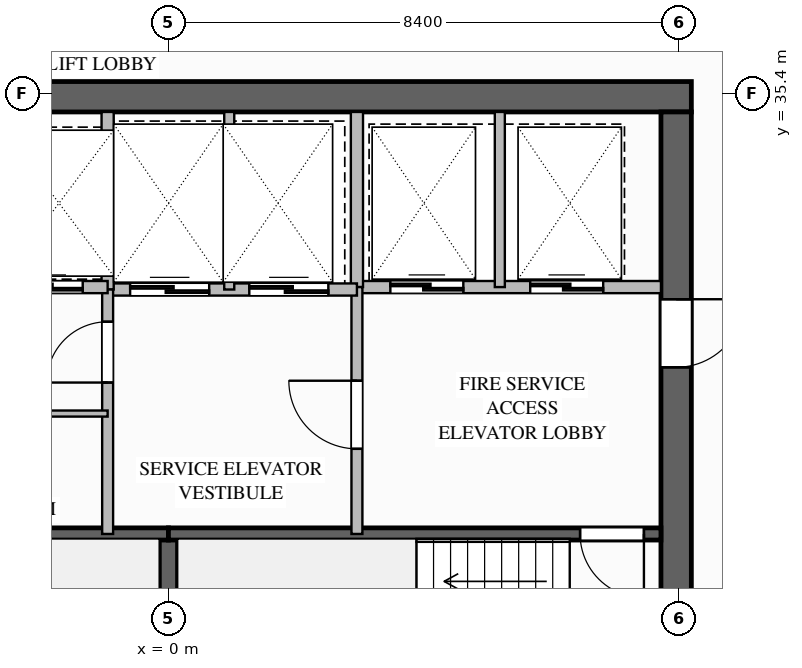
"""IFC4 building model, lengths in metres.
Left out: names, types, materials, properties, quantities, classifications, styles, units other than length and angle.
Written with IfcOpenShell. Run it as: python <this file> out.ifc"""

import sys

from ifc_helpers import new_model, si_unit, direction, frame, frame_2d, origin, place, context, subcontext, project, spatial, rectangle, extrude, element, fill, save


model = new_model("IFC4")
c1 = context("Model", 3, precision=1e-05, world=origin(), true_north=direction((0.0, 1.0)))
c2 = subcontext(c1, "Body", "Model", "MODEL_VIEW")
j1 = project(units=[si_unit("LENGTHUNIT", "METRE"), si_unit("PLANEANGLEUNIT", "RADIAN")], contexts=[c1])
p1 = place(None, origin())
s1 = spatial("IfcSite", under=j1, at=p1, CompositionType="ELEMENT")
p2 = place(p1, origin())
s2 = spatial("IfcBuilding", under=s1, at=p2, CompositionType="ELEMENT")
p3 = place(p2, frame((0.0, 0.0, 161.05)))
s3 = spatial("IfcBuildingStorey", under=s2, at=p3, CompositionType="ELEMENT", Elevation=161.05)
p4 = place(p3, frame((-8.6, 35.35, 0.0), z_axis=(0.0, 0.0, 1.0), x_axis=(1.0, 0.0, 0.0)))
e1 = element("IfcWall", 1, at=p4, inside=s3, PredefinedType="SHEAR", context=c2, shape_type="SweptSolid", body=[
    extrude(rectangle(XDim=17.2, YDim=0.5, at=frame_2d((8.6, 0.0))), origin(), (0.0, 0.0, 1.0), 3.55),
])
p5 = place(p3, frame((8.35, 35.1, 0.0), z_axis=(0.0, 0.0, 1.0), x_axis=(0.0, -1.0, 0.0)))
e2 = element("IfcWall", 2, at=p5, inside=s3, PredefinedType="SHEAR", context=c2, shape_type="SweptSolid", body=[
    extrude(rectangle(XDim=16.2, YDim=0.5, at=frame_2d((8.1, 0.0))), origin(), (0.0, 0.0, 1.0), 3.55),
])
p6 = place(p5, frame((3.08, 0.0, 0.0)))
e3 = element("IfcOpeningElement", 3, at=p6, cuts=e2, PredefinedType="OPENING", context=c2, shape_type="SweptSolid", body=[
    extrude(rectangle(XDim=1.12, YDim=2.1, at=frame_2d((0.56, 1.05))), frame((0.0, 0.26, 0.0), z_axis=(0.0, -1.0, 0.0), x_axis=(1.0, 0.0, 0.0)), (0.0, 0.0, 1.0), 0.52),
])
p7 = place(p5, frame((10.62, 0.0, 0.0)))
e4 = element("IfcOpeningElement", 4, at=p7, cuts=e2, PredefinedType="OPENING", context=c2, shape_type="SweptSolid", body=[
    extrude(rectangle(XDim=1.08, YDim=2.04, at=frame_2d((0.54, 1.02))), frame((0.0, 0.26, 0.0), z_axis=(0.0, -1.0, 0.0), x_axis=(1.0, 0.0, 0.0)), (0.0, 0.0, 1.0), 0.52),
])
p8 = place(p3, frame((0.0, 25.04, 0.0), z_axis=(0.0, 0.0, 1.0), x_axis=(0.0, 1.0, 0.0)))
e5 = element("IfcWall", 5, at=p8, inside=s3, PredefinedType="SOLIDWALL", context=c2, shape_type="SweptSolid", body=[
    extrude(rectangle(XDim=3.12, YDim=0.3, at=frame_2d((1.56, 0.0))), origin(), (0.0, 0.0, 1.0), 3.29),
])
p9 = place(p3, frame((-8.1, 28.16, 0.0), z_axis=(0.0, 0.0, 1.0), x_axis=(1.0, 0.0, 0.0)))
e6 = element("IfcWall", 6, at=p9, inside=s3, PredefinedType="SOLIDWALL", context=c2, shape_type="SweptSolid", body=[
    extrude(rectangle(XDim=8.1, YDim=0.2, at=frame_2d((4.05, 0.0))), origin(), (0.0, 0.0, 1.0), 3.29),
])
p10 = place(p3, frame((8.1, 28.16, 0.0), z_axis=(0.0, 0.0, 1.0), x_axis=(-1.0, 0.0, 0.0)))
e7 = element("IfcWall", 7, at=p10, inside=s3, PredefinedType="SOLIDWALL", context=c2, shape_type="SweptSolid", body=[
    extrude(rectangle(XDim=8.1, YDim=0.2, at=frame_2d((4.05, 0.0))), origin(), (0.0, 0.0, 1.0), 3.29),
])
p11 = place(p10, frame((0.28, 0.0, 0.0)))
e8 = element("IfcOpeningElement", 8, at=p11, cuts=e7, PredefinedType="OPENING", context=c2, shape_type="SweptSolid", body=[
    extrude(rectangle(XDim=1.05, YDim=2.1, at=frame_2d((0.525, 1.05))), frame((0.0, 0.11, 0.0), z_axis=(0.0, -1.0, 0.0), x_axis=(1.0, 0.0, 0.0)), (0.0, 0.0, 1.0), 0.22),
])
p12 = place(p3, frame((3.1, 32.22, 0.0), z_axis=(0.0, 0.0, 1.0), x_axis=(1.0, 0.0, 0.0)))
e9 = element("IfcWall", 9, at=p12, inside=s3, PredefinedType="SOLIDWALL", context=c2, shape_type="SweptSolid", body=[
    extrude(rectangle(XDim=5.0, YDim=0.2, at=frame_2d((2.5, 0.0))), origin(), (0.0, 0.0, 1.0), 3.29),
])
p13 = place(p12, frame((0.55, 0.0, 0.0)))
e10 = element("IfcOpeningElement", 10, at=p13, cuts=e9, PredefinedType="OPENING", context=c2, shape_type="SweptSolid", body=[
    extrude(rectangle(XDim=1.2, YDim=2.2, at=frame_2d((0.6, 1.1))), frame((0.0, 0.11, 0.0), z_axis=(0.0, -1.0, 0.0), x_axis=(1.0, 0.0, 0.0)), (0.0, 0.0, 1.0), 0.22),
])
p14 = place(p12, frame((2.85, 0.0, 0.0)))
e11 = element("IfcOpeningElement", 11, at=p14, cuts=e9, PredefinedType="OPENING", context=c2, shape_type="SweptSolid", body=[
    extrude(rectangle(XDim=1.2, YDim=2.2, at=frame_2d((0.6, 1.1))), frame((0.0, 0.11, 0.0), z_axis=(0.0, -1.0, 0.0), x_axis=(1.0, 0.0, 0.0)), (0.0, 0.0, 1.0), 0.22),
])
p15 = place(p3, frame((3.1, 32.22, 0.0), z_axis=(0.0, 0.0, 1.0), x_axis=(0.0, 1.0, 0.0)))
e12 = element("IfcWall", 12, at=p15, inside=s3, PredefinedType="SOLIDWALL", context=c2, shape_type="SweptSolid", body=[
    extrude(rectangle(XDim=2.88, YDim=0.2, at=frame_2d((1.44, 0.0))), origin(), (0.0, 0.0, 1.0), 3.29),
])
p16 = place(p3, frame((5.45, 32.22, 0.0), z_axis=(0.0, 0.0, 1.0), x_axis=(0.0, 1.0, 0.0)))
e13 = element("IfcWall", 13, at=p16, inside=s3, PredefinedType="PARTITIONING", context=c2, shape_type="SweptSolid", body=[
    extrude(rectangle(XDim=2.88, YDim=0.165, at=frame_2d((1.44, 0.0))), origin(), (0.0, 0.0, 1.0), 3.29),
])
p17 = place(p3, frame((3.1, 28.16, 0.0), z_axis=(0.0, 0.0, 1.0), x_axis=(0.0, 1.0, 0.0)))
e14 = element("IfcWall", 14, at=p17, inside=s3, PredefinedType="SOLIDWALL", context=c2, shape_type="SweptSolid", body=[
    extrude(rectangle(XDim=4.06, YDim=0.18, at=frame_2d((2.03, 0.0))), origin(), (0.0, 0.0, 1.0), 3.29),
])
p18 = place(p17, frame((1.4, 0.0, 0.0)))
e15 = element("IfcOpeningElement", 15, at=p18, cuts=e14, PredefinedType="OPENING", context=c2, shape_type="SweptSolid", body=[
    extrude(rectangle(XDim=1.12, YDim=2.1, at=frame_2d((0.56, 1.05))), frame((0.0, 0.1, 0.0), z_axis=(0.0, -1.0, 0.0), x_axis=(1.0, 0.0, 0.0)), (0.0, 0.0, 1.0), 0.2),
])
p19 = place(p3, frame((-1.0, 32.18, 0.0), z_axis=(0.0, 0.0, 1.0), x_axis=(1.0, 0.0, 0.0)))
e16 = element("IfcWall", 16, at=p19, inside=s3, PredefinedType="SOLIDWALL", context=c2, shape_type="SweptSolid", body=[
    extrude(rectangle(XDim=4.1, YDim=0.2, at=frame_2d((2.05, 0.0))), origin(), (0.0, 0.0, 1.0), 3.29),
])
p20 = place(p19, frame((0.37, 0.0, 0.0)))
e17 = element("IfcOpeningElement", 17, at=p20, cuts=e16, PredefinedType="OPENING", context=c2, shape_type="SweptSolid", body=[
    extrude(rectangle(XDim=1.3, YDim=2.2, at=frame_2d((0.65, 1.1))), frame((0.0, 0.11, 0.0), z_axis=(0.0, -1.0, 0.0), x_axis=(1.0, 0.0, 0.0)), (0.0, 0.0, 1.0), 0.22),
])
p21 = place(p19, frame((2.33, 0.0, 0.0)))
e18 = element("IfcOpeningElement", 18, at=p21, cuts=e16, PredefinedType="OPENING", context=c2, shape_type="SweptSolid", body=[
    extrude(rectangle(XDim=1.3, YDim=2.2, at=frame_2d((0.65, 1.1))), frame((0.0, 0.11, 0.0), z_axis=(0.0, -1.0, 0.0), x_axis=(1.0, 0.0, 0.0)), (0.0, 0.0, 1.0), 0.22),
])
p22 = place(p3, frame((-1.0, 32.18, 0.0), z_axis=(0.0, 0.0, 1.0), x_axis=(0.0, 1.0, 0.0)))
e19 = element("IfcWall", 19, at=p22, inside=s3, PredefinedType="SOLIDWALL", context=c2, shape_type="SweptSolid", body=[
    extrude(rectangle(XDim=2.92, YDim=0.2, at=frame_2d((1.46, 0.0))), origin(), (0.0, 0.0, 1.0), 3.29),
])
p23 = place(p3, frame((1.0, 32.18, 0.0), z_axis=(0.0, 0.0, 1.0), x_axis=(0.0, 1.0, 0.0)))
e20 = element("IfcWall", 20, at=p23, inside=s3, PredefinedType="PARTITIONING", context=c2, shape_type="SweptSolid", body=[
    extrude(rectangle(XDim=2.92, YDim=0.165, at=frame_2d((1.46, 0.0))), origin(), (0.0, 0.0, 1.0), 3.29),
])
p24 = place(p3, frame((-1.0, 28.16, 0.0), z_axis=(0.0, 0.0, 1.0), x_axis=(0.0, 1.0, 0.0)))
e21 = element("IfcWall", 21, at=p24, inside=s3, PredefinedType="SOLIDWALL", context=c2, shape_type="SweptSolid", body=[
    extrude(rectangle(XDim=4.02, YDim=0.18, at=frame_2d((2.01, 0.0))), origin(), (0.0, 0.0, 1.0), 3.29),
])
p25 = place(p24, frame((2.49, 0.0, 0.0)))
e22 = element("IfcOpeningElement", 22, at=p25, cuts=e21, PredefinedType="OPENING", context=c2, shape_type="SweptSolid", body=[
    extrude(rectangle(XDim=1.0, YDim=2.1, at=frame_2d((0.5, 1.05))), frame((0.0, 0.1, 0.0), z_axis=(0.0, -1.0, 0.0), x_axis=(1.0, 0.0, 0.0)), (0.0, 0.0, 1.0), 0.2),
])
p26 = place(p3, frame((-8.1, 32.22, 0.0), z_axis=(0.0, 0.0, 1.0), x_axis=(1.0, 0.0, 0.0)))
e23 = element("IfcWall", 23, at=p26, inside=s3, PredefinedType="SOLIDWALL", context=c2, shape_type="SweptSolid", body=[
    extrude(rectangle(XDim=7.1, YDim=0.2, at=frame_2d((3.55, 0.0))), origin(), (0.0, 0.0, 1.0), 3.29),
])
p27 = place(p26, frame((0.95, 0.0, 0.0)))
e24 = element("IfcOpeningElement", 24, at=p27, cuts=e23, PredefinedType="OPENING", context=c2, shape_type="SweptSolid", body=[
    extrude(rectangle(XDim=1.1, YDim=2.2, at=frame_2d((0.55, 1.1))), frame((0.0, 0.11, 0.0), z_axis=(0.0, -1.0, 0.0), x_axis=(1.0, 0.0, 0.0)), (0.0, 0.0, 1.0), 0.22),
])
p28 = place(p26, frame((3.27, 0.0, 0.0)))
e25 = element("IfcOpeningElement", 25, at=p28, cuts=e23, PredefinedType="OPENING", context=c2, shape_type="SweptSolid", body=[
    extrude(rectangle(XDim=1.1, YDim=2.2, at=frame_2d((0.55, 1.1))), frame((0.0, 0.11, 0.0), z_axis=(0.0, -1.0, 0.0), x_axis=(1.0, 0.0, 0.0)), (0.0, 0.0, 1.0), 0.22),
])
p29 = place(p26, frame((5.59, 0.0, 0.0)))
e26 = element("IfcOpeningElement", 26, at=p29, cuts=e23, PredefinedType="OPENING", context=c2, shape_type="SweptSolid", body=[
    extrude(rectangle(XDim=1.1, YDim=2.2, at=frame_2d((0.55, 1.1))), frame((0.0, 0.11, 0.0), z_axis=(0.0, -1.0, 0.0), x_axis=(1.0, 0.0, 0.0)), (0.0, 0.0, 1.0), 0.22),
])
p30 = place(p3, frame((-8.1, 30.14, 0.0), z_axis=(0.0, 0.0, 1.0), x_axis=(1.0, 0.0, 0.0)))
e27 = element("IfcWall", 27, at=p30, inside=s3, PredefinedType="PARTITIONING", context=c2, shape_type="SweptSolid", body=[
    extrude(rectangle(XDim=7.1, YDim=0.1, at=frame_2d((3.55, 0.0))), origin(), (0.0, 0.0, 1.0), 3.29),
])
p31 = place(p30, frame((0.55, 0.0, 0.0)))
e28 = element("IfcOpeningElement", 28, at=p31, cuts=e27, PredefinedType="OPENING", context=c2, shape_type="SweptSolid", body=[
    extrude(rectangle(XDim=0.88, YDim=2.1, at=frame_2d((0.44, 1.05))), frame((0.0, 0.06, 0.0), z_axis=(0.0, -1.0, 0.0), x_axis=(1.0, 0.0, 0.0)), (0.0, 0.0, 1.0), 0.12),
])
p32 = place(p30, frame((3.6, 0.0, 0.0)))
e29 = element("IfcOpeningElement", 29, at=p32, cuts=e27, PredefinedType="OPENING", context=c2, shape_type="SweptSolid", body=[
    extrude(rectangle(XDim=0.92, YDim=2.1, at=frame_2d((0.46, 1.05))), frame((0.0, 0.06, 0.0), z_axis=(0.0, -1.0, 0.0), x_axis=(1.0, 0.0, 0.0)), (0.0, 0.0, 1.0), 0.12),
])
p33 = place(p11, origin())
e30 = element("IfcDoor", 30, at=p33, inside=s3, OperationType="SINGLE_SWING_LEFT", PredefinedType="DOOR", context=c2, shape_type="SweptSolid", body=[
    extrude(rectangle(XDim=1.05, YDim=2.1, at=frame_2d((0.525, 1.05))), frame((0.0, 0.025, 0.0), z_axis=(0.0, -1.0, 0.0), x_axis=(1.0, 0.0, 0.0)), (0.0, 0.0, 1.0), 0.05),
])
fill(e8, e30)
p34 = place(p13, origin())
e31 = element("IfcDoor", 31, at=p34, inside=s3, OperationType="SLIDING_TO_LEFT", PredefinedType="DOOR", context=c2, shape_type="SweptSolid", body=[
    extrude(rectangle(XDim=1.2, YDim=2.2, at=frame_2d((0.6, 1.1))), frame((0.0, 0.025, 0.0), z_axis=(0.0, -1.0, 0.0), x_axis=(1.0, 0.0, 0.0)), (0.0, 0.0, 1.0), 0.05),
])
fill(e10, e31)
p35 = place(p14, origin())
e32 = element("IfcDoor", 32, at=p35, inside=s3, OperationType="SLIDING_TO_LEFT", PredefinedType="DOOR", context=c2, shape_type="SweptSolid", body=[
    extrude(rectangle(XDim=1.2, YDim=2.2, at=frame_2d((0.6, 1.1))), frame((0.0, 0.025, 0.0), z_axis=(0.0, -1.0, 0.0), x_axis=(1.0, 0.0, 0.0)), (0.0, 0.0, 1.0), 0.05),
])
fill(e11, e32)
p36 = place(p18, origin())
e33 = element("IfcDoor", 33, at=p36, inside=s3, OperationType="SINGLE_SWING_RIGHT", PredefinedType="DOOR", context=c2, shape_type="SweptSolid", body=[
    extrude(rectangle(XDim=1.12, YDim=2.1, at=frame_2d((0.56, 1.05))), frame((0.0, 0.025, 0.0), z_axis=(0.0, -1.0, 0.0), x_axis=(1.0, 0.0, 0.0)), (0.0, 0.0, 1.0), 0.05),
])
fill(e15, e33)
p37 = place(p6, origin())
e34 = element("IfcDoor", 34, at=p37, inside=s3, OperationType="SINGLE_SWING_LEFT", PredefinedType="DOOR", context=c2, shape_type="SweptSolid", body=[
    extrude(rectangle(XDim=1.12, YDim=2.1, at=frame_2d((0.56, 1.05))), frame((0.0, 0.025, 0.0), z_axis=(0.0, -1.0, 0.0), x_axis=(1.0, 0.0, 0.0)), (0.0, 0.0, 1.0), 0.05),
])
fill(e3, e34)
p38 = place(p20, origin())
e35 = element("IfcDoor", 35, at=p38, inside=s3, OperationType="SLIDING_TO_LEFT", PredefinedType="DOOR", context=c2, shape_type="SweptSolid", body=[
    extrude(rectangle(XDim=1.3, YDim=2.2, at=frame_2d((0.65, 1.1))), frame((0.0, 0.025, 0.0), z_axis=(0.0, -1.0, 0.0), x_axis=(1.0, 0.0, 0.0)), (0.0, 0.0, 1.0), 0.05),
])
fill(e17, e35)
p39 = place(p21, origin())
e36 = element("IfcDoor", 36, at=p39, inside=s3, OperationType="SLIDING_TO_LEFT", PredefinedType="DOOR", context=c2, shape_type="SweptSolid", body=[
    extrude(rectangle(XDim=1.3, YDim=2.2, at=frame_2d((0.65, 1.1))), frame((0.0, 0.025, 0.0), z_axis=(0.0, -1.0, 0.0), x_axis=(1.0, 0.0, 0.0)), (0.0, 0.0, 1.0), 0.05),
])
fill(e18, e36)
p40 = place(p25, origin())
e37 = element("IfcDoor", 37, at=p40, inside=s3, OperationType="SINGLE_SWING_LEFT", PredefinedType="DOOR", context=c2, shape_type="SweptSolid", body=[
    extrude(rectangle(XDim=1.0, YDim=2.1, at=frame_2d((0.5, 1.05))), frame((0.0, 0.025, 0.0), z_axis=(0.0, -1.0, 0.0), x_axis=(1.0, 0.0, 0.0)), (0.0, 0.0, 1.0), 0.05),
])
fill(e22, e37)
p41 = place(p29, origin())
e38 = element("IfcDoor", 38, at=p41, inside=s3, OperationType="SLIDING_TO_LEFT", PredefinedType="DOOR", context=c2, shape_type="SweptSolid", body=[
    extrude(rectangle(XDim=1.1, YDim=2.2, at=frame_2d((0.55, 1.1))), frame((0.0, 0.025, 0.0), z_axis=(0.0, -1.0, 0.0), x_axis=(1.0, 0.0, 0.0)), (0.0, 0.0, 1.0), 0.05),
])
fill(e26, e38)
save(model, sys.argv[1])
